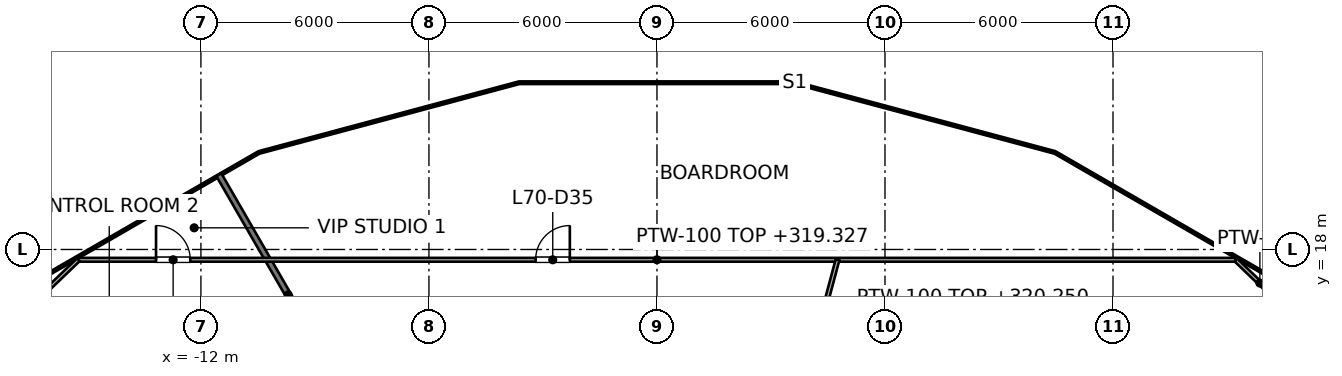
"""IFC4 building model, lengths in metres.
Left out: names, types, materials, properties, quantities, classifications, styles, units other than length and angle.
Written with IfcOpenShell. Run it as: python <this file> out.ifc"""

import sys

from ifc_helpers import new_model, si_unit, direction, frame, frame_2d, origin, place, context, subcontext, project, spatial, rectangle, extrude, element, fill, save


model = new_model("IFC4")
c1 = context("Model", 3, precision=1e-05, world=origin(), true_north=direction((0.0, 1.0)))
c2 = subcontext(c1, "Body", "Model", "MODEL_VIEW")
j1 = project(units=[si_unit("LENGTHUNIT", "METRE"), si_unit("PLANEANGLEUNIT", "RADIAN")], contexts=[c1])
p1 = place(None, origin())
s1 = spatial("IfcSite", under=j1, at=p1, CompositionType="ELEMENT")
p2 = place(p1, origin())
s2 = spatial("IfcBuilding", under=s1, at=p2, CompositionType="ELEMENT")
p3 = place(p2, frame((0.0, 0.0, 316.4)))
s3 = spatial("IfcBuildingStorey", under=s2, at=p3, CompositionType="ELEMENT", Elevation=316.4)
p4 = place(p3, frame((-11.528, 19.967, 0.0), z_axis=(0.0, 0.0, 1.0), x_axis=(0.500018883198, -0.86601450129, 0.0)))
e1 = element("IfcWall", 1, at=p4, inside=s3, PredefinedType="PARTITIONING", context=c2, shape_type="SweptSolid", body=[
    extrude(rectangle(XDim=7.296, YDim=0.15, at=frame_2d((3.648, 0.0))), origin(), (0.0, 0.0, 1.0), 3.475),
])
p5 = place(p3, frame((13.618, 13.617, 0.0), z_axis=(0.0, 0.0, 1.0), x_axis=(0.707106781187, 0.707106781187, 0.0)))
e2 = element("IfcWall", 2, at=p5, inside=s3, PredefinedType="PARTITIONING", context=c2, shape_type="SweptSolid", body=[
    extrude(rectangle(XDim=4.428, YDim=0.15, at=frame_2d((2.214, 0.0))), origin(), (0.0, 0.0, 1.0), 3.475),
])
p6 = place(p3, frame((15.226, 17.729, 0.0), z_axis=(0.0, 0.0, 1.0), x_axis=(0.72116413062, -0.692764243236, 0.0)))
e3 = element("IfcWall", 3, at=p6, inside=s3, PredefinedType="PARTITIONING", context=c2, shape_type="SweptSolid", body=[
    extrude(rectangle(XDim=1.771, YDim=0.1, at=frame_2d((0.885, 0.0))), origin(), (0.0, 0.0, 1.0), 2.995),
])
p7 = place(p3, frame((-15.226, 17.729, 0.0), z_axis=(0.0, 0.0, 1.0), x_axis=(1.0, 0.0, 0.0)))
e4 = element("IfcWall", 4, at=p7, inside=s3, PredefinedType="PARTITIONING", context=c2, shape_type="SweptSolid", body=[
    extrude(rectangle(XDim=30.452, YDim=0.1, at=frame_2d((15.226, 0.0))), origin(), (0.0, 0.0, 1.0), 2.927),
])
p8 = place(p7, frame((2.045, 0.0, 0.0)))
e5 = element("IfcOpeningElement", 5, at=p8, cuts=e4, PredefinedType="OPENING", context=c2, shape_type="SweptSolid", body=[
    extrude(rectangle(XDim=0.9, YDim=2.1, at=frame_2d((0.45, 1.05))), frame((0.0, 0.05, 0.0), z_axis=(0.0, -1.0, 0.0), x_axis=(1.0, 0.0, 0.0)), (0.0, 0.0, 1.0), 0.1),
])
p9 = place(p7, frame((12.033, 0.0, 0.0)))
e6 = element("IfcOpeningElement", 6, at=p9, cuts=e4, PredefinedType="OPENING", context=c2, shape_type="SweptSolid", body=[
    extrude(rectangle(XDim=0.9, YDim=2.1, at=frame_2d((0.45, 1.05))), frame((0.0, 0.05, 0.0), z_axis=(0.0, -1.0, 0.0), x_axis=(1.0, 0.0, 0.0)), (0.0, 0.0, 1.0), 0.1),
])
p10 = place(p3, frame((-21.054, 12.132, 0.0), z_axis=(0.0, 0.0, 1.0), x_axis=(0.721283461162, 0.692639999317, 0.0)))
e7 = element("IfcWall", 7, at=p10, inside=s3, PredefinedType="PARTITIONING", context=c2, shape_type="SweptSolid", body=[
    extrude(rectangle(XDim=8.08, YDim=0.1, at=frame_2d((4.04, 0.0))), origin(), (0.0, 0.0, 1.0), 2.995),
])
p11 = place(p3, frame((3.658, 13.649, 0.0), z_axis=(0.0, 0.0, 1.0), x_axis=(0.258766902147, 0.965939796444, 0.0)))
e8 = element("IfcWall", 8, at=p11, inside=s3, PredefinedType="PARTITIONING", context=c2, shape_type="SweptSolid", body=[
    extrude(rectangle(XDim=4.224, YDim=0.1, at=frame_2d((2.112, 0.0))), origin(), (0.0, 0.0, 1.0), 3.85),
])
p12 = place(p8, origin())
e9 = element("IfcDoor", 9, at=p12, inside=s3, OperationType="SINGLE_SWING_LEFT", PredefinedType="DOOR", context=c2, shape_type="SweptSolid", body=[
    extrude(rectangle(XDim=0.9, YDim=2.1, at=frame_2d((0.45, 1.05))), frame((0.0, 0.025, 0.0), z_axis=(0.0, -1.0, 0.0), x_axis=(1.0, 0.0, 0.0)), (0.0, 0.0, 1.0), 0.05),
])
fill(e5, e9)
p13 = place(p9, origin())
e10 = element("IfcDoor", 10, at=p13, inside=s3, OperationType="SINGLE_SWING_RIGHT", PredefinedType="DOOR", context=c2, shape_type="SweptSolid", body=[
    extrude(rectangle(XDim=0.9, YDim=2.1, at=frame_2d((0.45, 1.05))), frame((0.0, 0.025, 0.0), z_axis=(0.0, -1.0, 0.0), x_axis=(1.0, 0.0, 0.0)), (0.0, 0.0, 1.0), 0.05),
])
fill(e6, e10)
save(model, sys.argv[1])
